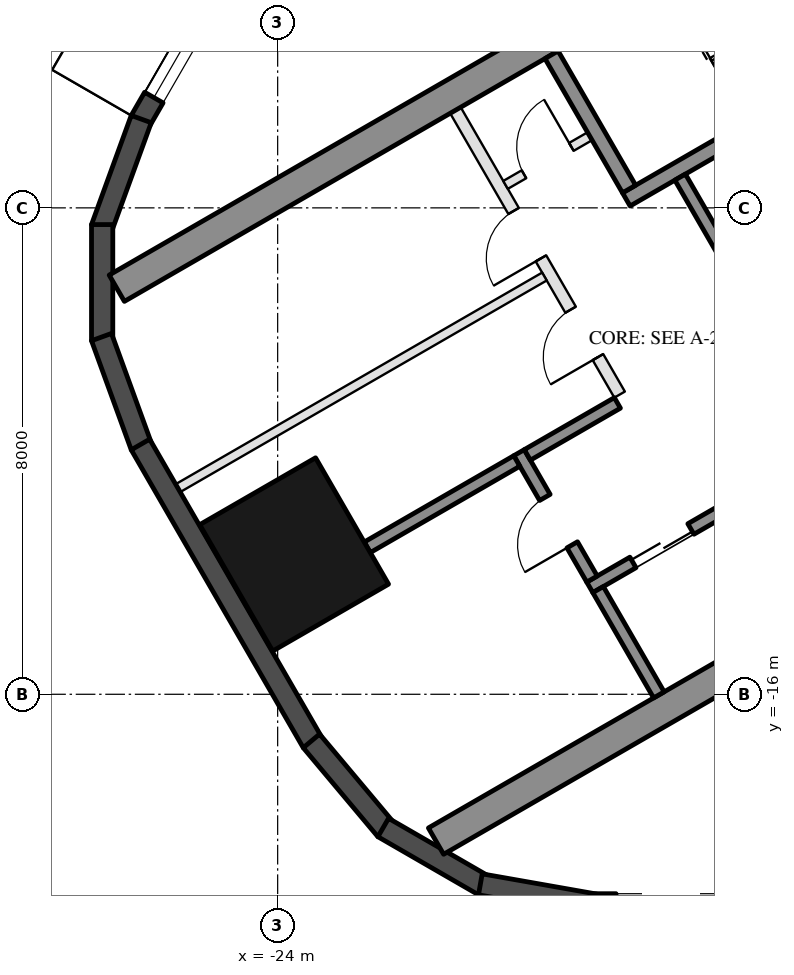
"""IFC4 building model, lengths in metres.
Left out: names, types, materials, properties, quantities, classifications, styles, units other than length and angle.
Written with IfcOpenShell. Run it as: python <this file> out.ifc"""

import sys

from ifc_helpers import new_model, si_unit, direction, frame, frame_2d, origin, origin_2d, place, context, subcontext, project, spatial, rectangle, hollow_rectangle, extrude, element, fill, save


model = new_model("IFC4")
c1 = context("Model", 3, precision=1e-05, world=origin(), true_north=direction((0.0, 1.0)))
c2 = subcontext(c1, "Body", "Model", "MODEL_VIEW")
j1 = project(units=[si_unit("LENGTHUNIT", "METRE"), si_unit("PLANEANGLEUNIT", "RADIAN")], contexts=[c1])
p1 = place(None, origin())
s1 = spatial("IfcSite", under=j1, at=p1, CompositionType="ELEMENT")
p2 = place(p1, origin())
s2 = spatial("IfcBuilding", under=s1, at=p2, CompositionType="ELEMENT")
p3 = place(p2, frame((0.0, 0.0, 168.8)))
s3 = spatial("IfcBuildingStorey", under=s2, at=p3, CompositionType="ELEMENT", Elevation=168.8)
p4 = place(p3, frame((-23.729, -13.7, 0.0), z_axis=(0.0, 0.0, 1.0), x_axis=(-0.5, 0.866025403784, 0.0)))
e1 = element("IfcColumn", 1, at=p4, inside=s3, PredefinedType="COLUMN", context=c2, shape_type="SweptSolid", body=[
    extrude(hollow_rectangle(XDim=2.4, YDim=2.2, WallThickness=0.06, at=origin_2d()), origin(), (0.0, 0.0, 1.0), 3.7),
])
p5 = place(p3, frame((-24.299, -3.176, 0.0), z_axis=(0.0, 0.0, 1.0), x_axis=(-0.500028278809, -0.866009076391, 0.0)))
e2 = element("IfcWall", 2, at=p5, inside=s3, PredefinedType="SOLIDWALL", context=c2, shape_type="SweptSolid", body=[
    extrude(rectangle(XDim=3.916, YDim=0.35, at=frame_2d((1.958, 0.0))), origin(), (0.0, 0.0, 1.0), 3.55),
])
p6 = place(p5, frame((1.675, 0.0, 0.3)))
e3 = element("IfcOpeningElement", 3, at=p6, cuts=e2, PredefinedType="OPENING", context=c2, shape_type="SweptSolid", body=[
    extrude(rectangle(XDim=1.8, YDim=2.65, at=frame_2d((0.9, 1.325))), frame((0.0, 0.185, 0.0), z_axis=(0.0, -1.0, 0.0), x_axis=(1.0, 0.0, 0.0)), (0.0, 0.0, 1.0), 0.37),
])
for number, where, z_axis, x_axis in (
    (4, (-26.244, -6.54, 0.0), (0.0, 0.0, 1.0), (-0.342, -0.94, 0.0)),
    (5, (-26.886, -8.275, 0.0), (0.0, 0.0, 1.0), (0.0, -1.0, 0.0)),
    (6, (-26.897, -10.125, 0.0), (0.0, 0.0, 1.0), (0.342, -0.94, 0.0)),
):
    element("IfcWall", number, at=place(p3, frame(where, z_axis=z_axis, x_axis=x_axis)), inside=s3, PredefinedType="SOLIDWALL", context=c2, shape_type="SweptSolid", body=[
        extrude(rectangle(XDim=1.91, YDim=0.35, at=frame_2d((0.955, 0.0))), origin(), (0.0, 0.0, 1.0), 3.55),
    ])
p7 = place(p3, frame((-26.257, -11.893, 0.0), z_axis=(0.0, 0.0, 1.0), x_axis=(0.500018773155, -0.866014564827, 0.0)))
e7 = element("IfcWall", 7, at=p7, inside=s3, PredefinedType="SOLIDWALL", context=c2, shape_type="SweptSolid", body=[
    extrude(rectangle(XDim=5.658, YDim=0.35, at=frame_2d((2.829, 0.0))), origin(), (0.0, 0.0, 1.0), 3.55),
])
for number, where, z_axis, x_axis in (
    (8, (-23.445, -16.768, 0.0), (0.0, 0.0, 1.0), (0.643, -0.766, 0.0)),
    (9, (-22.264, -18.192, 0.0), (0.0, 0.0, 1.0), (0.866, -0.5, 0.0)),
):
    element("IfcWall", number, at=place(p3, frame(where, z_axis=z_axis, x_axis=x_axis)), inside=s3, PredefinedType="SOLIDWALL", context=c2, shape_type="SweptSolid", body=[
        extrude(rectangle(XDim=1.91, YDim=0.35, at=frame_2d((0.955, 0.0))), origin(), (0.0, 0.0, 1.0), 3.55),
    ])
p8 = place(p3, frame((-20.667, -19.126, 0.0), z_axis=(0.0, 0.0, 1.0), x_axis=(0.984798995425, -0.173697837091, 0.0)))
e10 = element("IfcWall", 10, at=p8, inside=s3, PredefinedType="SOLIDWALL", context=c2, shape_type="SweptSolid", body=[
    extrude(rectangle(XDim=1.91, YDim=0.35, at=frame_2d((0.955, 0.0))), origin(), (0.0, 0.0, 1.0), 3.55),
])
p9 = place(p3, frame((-18.816, -19.455, 0.0), z_axis=(0.0, 0.0, 1.0), x_axis=(1.0, 0.0, 0.0)))
e11 = element("IfcWall", 11, at=p9, inside=s3, PredefinedType="SOLIDWALL", context=c2, shape_type="SweptSolid", body=[
    extrude(rectangle(XDim=11.816, YDim=0.35, at=frame_2d((5.908, 0.0))), origin(), (0.0, 0.0, 1.0), 3.55),
])
p10 = place(p9, frame((0.381, 0.0, 0.3)))
e12 = element("IfcOpeningElement", 12, at=p10, cuts=e11, PredefinedType="OPENING", context=c2, shape_type="SweptSolid", body=[
    extrude(rectangle(XDim=1.8, YDim=2.65, at=frame_2d((0.9, 1.325))), frame((0.0, 0.185, 0.0), z_axis=(0.0, -1.0, 0.0), x_axis=(1.0, 0.0, 0.0)), (0.0, 0.0, 1.0), 0.37),
])
p11 = place(p9, frame((7.74, 0.0, 0.0)))
e13 = element("IfcOpeningElement", 13, at=p11, cuts=e11, PredefinedType="OPENING", context=c2, shape_type="SweptSolid", body=[
    extrude(rectangle(XDim=2.4, YDim=2.4, at=frame_2d((1.2, 1.2))), frame((0.0, 0.185, 0.0), z_axis=(0.0, -1.0, 0.0), x_axis=(1.0, 0.0, 0.0)), (0.0, 0.0, 1.0), 0.37),
])
p12 = place(p9, frame((3.791, 0.0, 0.3)))
e14 = element("IfcOpeningElement", 14, at=p12, cuts=e11, PredefinedType="OPENING", context=c2, shape_type="SweptSolid", body=[
    extrude(rectangle(XDim=1.6, YDim=2.65, at=frame_2d((0.8, 1.325))), frame((0.0, 0.185, 0.0), z_axis=(0.0, -1.0, 0.0), x_axis=(1.0, 0.0, 0.0)), (0.0, 0.0, 1.0), 0.37),
])
p13 = place(p9, frame((5.691, 0.0, 0.3)))
e15 = element("IfcOpeningElement", 15, at=p13, cuts=e11, PredefinedType="OPENING", context=c2, shape_type="SweptSolid", body=[
    extrude(rectangle(XDim=1.6, YDim=2.65, at=frame_2d((0.8, 1.325))), frame((0.0, 0.185, 0.0), z_axis=(0.0, -1.0, 0.0), x_axis=(1.0, 0.0, 0.0)), (0.0, 0.0, 1.0), 0.37),
])
for number, where, z_axis, x_axis in (
    (16, (-13.797, -1.903, 0.0), (0.0, 0.0, 1.0), (-0.866, -0.5, 0.0)),
    (17, (-8.547, -10.997, 0.0), (0.0, 0.0, 1.0), (-0.866, -0.5, 0.0)),
):
    element("IfcWall", number, at=place(p3, frame(where, z_axis=z_axis, x_axis=x_axis)), inside=s3, PredefinedType="SHEAR", context=c2, shape_type="SweptSolid", body=[
        extrude(rectangle(XDim=14.837, YDim=0.5, at=frame_2d((7.418, 0.0))), origin(), (0.0, 0.0, 1.0), 3.5),
    ])
p14 = place(p3, frame((-12.681, -4.636, 0.0), z_axis=(0.0, 0.0, 1.0), x_axis=(-0.866021702275, -0.500006411147, 0.0)))
e18 = element("IfcWall", 18, at=p14, inside=s3, PredefinedType="SHEAR", context=c2, shape_type="SweptSolid", body=[
    extrude(rectangle(XDim=6.45, YDim=0.25, at=frame_2d((3.225, 0.0))), origin(), (0.0, 0.0, 1.0), 3.5),
])
p15 = place(p14, frame((0.3, 0.0, 0.0)))
e19 = element("IfcOpeningElement", 19, at=p15, cuts=e18, PredefinedType="OPENING", context=c2, shape_type="SweptSolid", body=[
    extrude(rectangle(XDim=1.0, YDim=2.1, at=frame_2d((0.5, 1.05))), frame((0.0, 0.135, 0.0), z_axis=(0.0, -1.0, 0.0), x_axis=(1.0, 0.0, 0.0)), (0.0, 0.0, 1.0), 0.27),
])
p16 = place(p3, frame((-19.496, -5.482, 0.0), z_axis=(0.0, 0.0, 1.0), x_axis=(0.499990435942, -0.866030925526, 0.0)))
e20 = element("IfcWall", 20, at=p16, inside=s3, PredefinedType="SHEAR", context=c2, shape_type="SweptSolid", body=[
    extrude(rectangle(XDim=2.55, YDim=0.25, at=frame_2d((1.275, 0.0))), origin(), (0.0, 0.0, 1.0), 3.5),
])
p17 = place(p3, frame((-17.381, -7.495, 0.0), z_axis=(0.0, 0.0, 1.0), x_axis=(0.500011755427, -0.866018616679, 0.0)))
e21 = element("IfcWall", 21, at=p17, inside=s3, PredefinedType="SHEAR", context=c2, shape_type="SweptSolid", body=[
    extrude(rectangle(XDim=2.8, YDim=0.2, at=frame_2d((1.4, 0.0))), origin(), (0.0, 0.0, 1.0), 3.5),
])
p18 = place(p3, frame((-10.068, -9.162, 0.0), z_axis=(0.0, 0.0, 1.0), x_axis=(-0.866032725843, -0.499987317609, 0.0)))
e22 = element("IfcWall", 22, at=p18, inside=s3, PredefinedType="SHEAR", context=c2, shape_type="SweptSolid", body=[
    extrude(rectangle(XDim=10.16, YDim=0.2, at=frame_2d((5.08, 0.0))), origin(), (0.0, 0.0, 1.0), 3.5),
])
p19 = place(p18, frame((0.62, 0.0, 0.0)))
e23 = element("IfcOpeningElement", 23, at=p19, cuts=e22, PredefinedType="OPENING", context=c2, shape_type="SweptSolid", body=[
    extrude(rectangle(XDim=1.1, YDim=2.1, at=frame_2d((0.55, 1.05))), frame((0.0, 0.11, 0.0), z_axis=(0.0, -1.0, 0.0), x_axis=(1.0, 0.0, 0.0)), (0.0, 0.0, 1.0), 0.22),
])
p20 = place(p18, frame((3.16, 0.0, 0.0)))
e24 = element("IfcOpeningElement", 24, at=p20, cuts=e22, PredefinedType="OPENING", context=c2, shape_type="SweptSolid", body=[
    extrude(rectangle(XDim=1.1, YDim=2.1, at=frame_2d((0.55, 1.05))), frame((0.0, 0.11, 0.0), z_axis=(0.0, -1.0, 0.0), x_axis=(1.0, 0.0, 0.0)), (0.0, 0.0, 1.0), 0.22),
])
p21 = place(p18, frame((5.7, 0.0, 0.0)))
e25 = element("IfcOpeningElement", 25, at=p21, cuts=e22, PredefinedType="OPENING", context=c2, shape_type="SweptSolid", body=[
    extrude(rectangle(XDim=1.1, YDim=2.1, at=frame_2d((0.55, 1.05))), frame((0.0, 0.11, 0.0), z_axis=(0.0, -1.0, 0.0), x_axis=(1.0, 0.0, 0.0)), (0.0, 0.0, 1.0), 0.22),
])
p22 = place(p18, frame((8.24, 0.0, 0.0)))
e26 = element("IfcOpeningElement", 26, at=p22, cuts=e22, PredefinedType="OPENING", context=c2, shape_type="SweptSolid", body=[
    extrude(rectangle(XDim=1.1, YDim=2.1, at=frame_2d((0.55, 1.05))), frame((0.0, 0.11, 0.0), z_axis=(0.0, -1.0, 0.0), x_axis=(1.0, 0.0, 0.0)), (0.0, 0.0, 1.0), 0.22),
])
p23 = place(p3, frame((-20.031, -12.026, 0.0), z_axis=(0.0, 0.0, 1.0), x_axis=(0.500033551112, -0.866006032174, 0.0)))
e27 = element("IfcWall", 27, at=p23, inside=s3, PredefinedType="SHEAR", context=c2, shape_type="SweptSolid", body=[
    extrude(rectangle(XDim=2.4, YDim=0.2, at=frame_2d((1.2, 0.0))), origin(), (0.0, 0.0, 1.0), 3.5),
])
p24 = place(p23, frame((0.85, 0.0, 0.0)))
e28 = element("IfcOpeningElement", 28, at=p24, cuts=e27, PredefinedType="OPENING", context=c2, shape_type="SweptSolid", body=[
    extrude(rectangle(XDim=0.9, YDim=2.1, at=frame_2d((0.45, 1.05))), frame((0.0, 0.11, 0.0), z_axis=(0.0, -1.0, 0.0), x_axis=(1.0, 0.0, 0.0)), (0.0, 0.0, 1.0), 0.22),
])
p25 = place(p3, frame((-18.413, -11.208, 0.0), z_axis=(0.0, 0.0, 1.0), x_axis=(-0.866038183914, -0.499977863513, 0.0)))
e29 = element("IfcWall", 29, at=p25, inside=s3, PredefinedType="SHEAR", context=c2, shape_type="SweptSolid", body=[
    extrude(rectangle(XDim=1.71, YDim=0.2, at=frame_2d((0.855, 0.0))), origin(), (0.0, 0.0, 1.0), 3.5),
])
p26 = place(p3, frame((-18.73, -14.278, 0.0), z_axis=(0.0, 0.0, 1.0), x_axis=(0.50002537861, -0.866010750942, 0.0)))
e30 = element("IfcWall", 30, at=p26, inside=s3, PredefinedType="SHEAR", context=c2, shape_type="SweptSolid", body=[
    extrude(rectangle(XDim=2.0, YDim=0.2, at=frame_2d((1.0, 0.0))), origin(), (0.0, 0.0, 1.0), 3.5),
])
p27 = place(p3, frame((-20.067, -12.163, 0.0), z_axis=(0.0, 0.0, 1.0), x_axis=(-0.866055327414, -0.49994816717, 0.0)))
e31 = element("IfcWall", 31, at=p27, inside=s3, PredefinedType="SHEAR", context=c2, shape_type="SweptSolid", body=[
    extrude(rectangle(XDim=2.84, YDim=0.2, at=frame_2d((1.42, 0.0))), origin(), (0.0, 0.0, 1.0), 3.5),
])
p28 = place(p3, frame((-21.076, -6.395, 0.0), z_axis=(0.0, 0.0, 1.0), x_axis=(0.50001468107, -0.866016927499, 0.0)))
e32 = element("IfcWall", 32, at=p28, inside=s3, PredefinedType="PARTITIONING", context=c2, shape_type="SweptSolid", body=[
    extrude(rectangle(XDim=5.4, YDim=0.2, at=frame_2d((2.7, 0.0))), origin(), (0.0, 0.0, 1.0), 3.5),
])
p29 = place(p28, frame((1.913, 0.0, 0.0)))
e33 = element("IfcOpeningElement", 33, at=p29, cuts=e32, PredefinedType="OPENING", context=c2, shape_type="SweptSolid", body=[
    extrude(rectangle(XDim=0.9, YDim=2.1, at=frame_2d((0.45, 1.05))), frame((0.0, 0.11, 0.0), z_axis=(0.0, -1.0, 0.0), x_axis=(1.0, 0.0, 0.0)), (0.0, 0.0, 1.0), 0.22),
])
p30 = place(p28, frame((3.788, 0.0, 0.0)))
e34 = element("IfcOpeningElement", 34, at=p30, cuts=e32, PredefinedType="OPENING", context=c2, shape_type="SweptSolid", body=[
    extrude(rectangle(XDim=0.9, YDim=2.1, at=frame_2d((0.45, 1.05))), frame((0.0, 0.11, 0.0), z_axis=(0.0, -1.0, 0.0), x_axis=(1.0, 0.0, 0.0)), (0.0, 0.0, 1.0), 0.22),
])
p31 = place(p3, frame((-18.866, -6.822, 0.0), z_axis=(0.0, 0.0, 1.0), x_axis=(-0.866028054938, -0.499995408039, 0.0)))
e35 = element("IfcWall", 35, at=p31, inside=s3, PredefinedType="PARTITIONING", context=c2, shape_type="SweptSolid", body=[
    extrude(rectangle(XDim=1.6, YDim=0.15, at=frame_2d((0.8, 0.0))), origin(), (0.0, 0.0, 1.0), 3.5),
])
p32 = place(p31, frame((0.35, 0.0, 0.0)))
e36 = element("IfcOpeningElement", 36, at=p32, cuts=e35, PredefinedType="OPENING", context=c2, shape_type="SweptSolid", body=[
    extrude(rectangle(XDim=0.9, YDim=2.1, at=frame_2d((0.45, 1.05))), frame((0.0, 0.085, 0.0), z_axis=(0.0, -1.0, 0.0), x_axis=(1.0, 0.0, 0.0)), (0.0, 0.0, 1.0), 0.17),
])
p33 = place(p3, frame((-19.613, -9.13, 0.0), z_axis=(0.0, 0.0, 1.0), x_axis=(-0.866031734426, -0.499989034847, 0.0)))
e37 = element("IfcWall", 37, at=p33, inside=s3, PredefinedType="PARTITIONING", context=c2, shape_type="SweptSolid", body=[
    extrude(rectangle(XDim=6.95, YDim=0.15, at=frame_2d((3.475, 0.0))), origin(), (0.0, 0.0, 1.0), 3.5),
])
p34 = place(p6, origin())
e38 = element("IfcWindow", 38, at=p34, inside=s3, PartitioningType="SINGLE_PANEL", PredefinedType="WINDOW", context=c2, shape_type="SweptSolid", body=[
    extrude(rectangle(XDim=1.8, YDim=2.65, at=frame_2d((0.9, 1.325))), frame((0.0, 0.03, 0.0), z_axis=(0.0, -1.0, 0.0), x_axis=(1.0, 0.0, 0.0)), (0.0, 0.0, 1.0), 0.06),
])
fill(e3, e38)
p35 = place(p32, frame((0.9, 0.0, 0.0), z_axis=(0.0, 0.0, 1.0), x_axis=(-1.0, 0.0, 0.0)))
e39 = element("IfcDoor", 39, at=p35, inside=s3, OperationType="SINGLE_SWING_RIGHT", PredefinedType="DOOR", context=c2, shape_type="SweptSolid", body=[
    extrude(rectangle(XDim=0.9, YDim=2.1, at=frame_2d((0.45, 1.05))), frame((0.0, 0.025, 0.0), z_axis=(0.0, -1.0, 0.0), x_axis=(1.0, 0.0, 0.0)), (0.0, 0.0, 1.0), 0.05),
])
fill(e36, e39)
p36 = place(p22, origin())
e40 = element("IfcDoor", 40, at=p36, inside=s3, OperationType="DOUBLE_DOOR_SLIDING", PredefinedType="DOOR", context=c2, shape_type="SweptSolid", body=[
    extrude(rectangle(XDim=1.1, YDim=2.1, at=frame_2d((0.55, 1.05))), frame((0.0, 0.025, 0.0), z_axis=(0.0, -1.0, 0.0), x_axis=(1.0, 0.0, 0.0)), (0.0, 0.0, 1.0), 0.05),
])
fill(e26, e40)
p37 = place(p24, frame((0.9, 0.0, 0.0), z_axis=(0.0, 0.0, 1.0), x_axis=(-1.0, 0.0, 0.0)))
e41 = element("IfcDoor", 41, at=p37, inside=s3, OperationType="SINGLE_SWING_LEFT", PredefinedType="DOOR", context=c2, shape_type="SweptSolid", body=[
    extrude(rectangle(XDim=0.9, YDim=2.1, at=frame_2d((0.45, 1.05))), frame((0.0, 0.025, 0.0), z_axis=(0.0, -1.0, 0.0), x_axis=(1.0, 0.0, 0.0)), (0.0, 0.0, 1.0), 0.05),
])
fill(e28, e41)
p38 = place(p29, frame((0.9, 0.0, 0.0), z_axis=(0.0, 0.0, 1.0), x_axis=(-1.0, 0.0, 0.0)))
e42 = element("IfcDoor", 42, at=p38, inside=s3, OperationType="SINGLE_SWING_LEFT", PredefinedType="DOOR", context=c2, shape_type="SweptSolid", body=[
    extrude(rectangle(XDim=0.9, YDim=2.1, at=frame_2d((0.45, 1.05))), frame((0.0, 0.025, 0.0), z_axis=(0.0, -1.0, 0.0), x_axis=(1.0, 0.0, 0.0)), (0.0, 0.0, 1.0), 0.05),
])
fill(e33, e42)
p39 = place(p30, frame((0.9, 0.0, 0.0), z_axis=(0.0, 0.0, 1.0), x_axis=(-1.0, 0.0, 0.0)))
e43 = element("IfcDoor", 43, at=p39, inside=s3, OperationType="SINGLE_SWING_LEFT", PredefinedType="DOOR", context=c2, shape_type="SweptSolid", body=[
    extrude(rectangle(XDim=0.9, YDim=2.1, at=frame_2d((0.45, 1.05))), frame((0.0, 0.025, 0.0), z_axis=(0.0, -1.0, 0.0), x_axis=(1.0, 0.0, 0.0)), (0.0, 0.0, 1.0), 0.05),
])
fill(e34, e43)
save(model, sys.argv[1])
